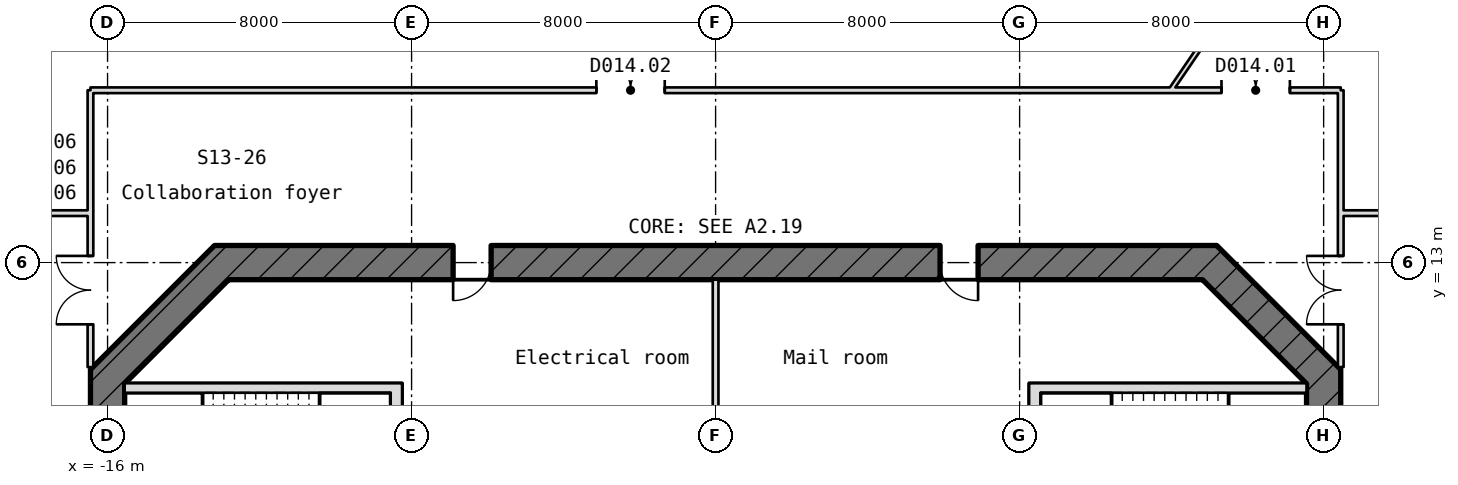
"""IFC4 building model, lengths in metres.
Left out: names, types, materials, properties, quantities, classifications, styles, units other than length and angle.
Written with IfcOpenShell. Run it as: python <this file> out.ifc"""

import sys

from ifc_helpers import new_model, si_unit, direction, frame, frame_2d, origin, place, context, subcontext, project, spatial, rectangle, extrude, element, fill, save


model = new_model("IFC4")
c1 = context("Model", 3, precision=1e-05, world=origin(), true_north=direction((0.0, 1.0)))
c2 = subcontext(c1, "Body", "Model", "MODEL_VIEW")
j1 = project(units=[si_unit("LENGTHUNIT", "METRE"), si_unit("PLANEANGLEUNIT", "RADIAN")], contexts=[c1])
p1 = place(None, origin())
s1 = spatial("IfcSite", under=j1, at=p1, CompositionType="ELEMENT")
p2 = place(p1, origin())
s2 = spatial("IfcBuilding", under=s1, at=p2, CompositionType="ELEMENT")
p3 = place(p2, frame((0.0, 0.0, 198.4)))
s3 = spatial("IfcBuildingStorey", under=s2, at=p3, CompositionType="ELEMENT", Elevation=198.4)
p4 = place(p3, frame((-15.74, 21.43, 0.0), z_axis=(0.0, 0.0, 1.0), x_axis=(-0.766015219317, -0.64282243565, 0.0)))
e1 = element("IfcWall", 1, at=p4, inside=s3, PredefinedType="SOLIDWALL", context=c2, shape_type="SweptSolid", body=[
    extrude(rectangle(XDim=11.371, YDim=0.3, at=frame_2d((5.686, 0.0))), origin(), (0.0, 0.0, 1.0), 3.97),
])
p5 = place(p4, frame((7.672, 0.0, 0.0)))
e2 = element("IfcOpeningElement", 2, at=p5, cuts=e1, PredefinedType="OPENING", context=c2, shape_type="SweptSolid", body=[
    extrude(rectangle(XDim=1.8, YDim=2.4, at=frame_2d((0.9, 1.2))), frame((0.0, 0.16, 0.0), z_axis=(0.0, -1.0, 0.0), x_axis=(1.0, 0.0, 0.0)), (0.0, 0.0, 1.0), 0.32),
])
p6 = place(p4, frame((5.072, 0.0, 0.9)))
e3 = element("IfcOpeningElement", 3, at=p6, cuts=e1, PredefinedType="OPENING", context=c2, shape_type="SweptSolid", body=[
    extrude(rectangle(XDim=2.0, YDim=1.5, at=frame_2d((1.0, 0.75))), frame((0.0, 0.16, 0.0), z_axis=(0.0, -1.0, 0.0), x_axis=(1.0, 0.0, 0.0)), (0.0, 0.0, 1.0), 0.32),
])
p7 = place(p3, frame((16.0, -10.186, -0.18), z_axis=(0.0, 0.0, 1.0), x_axis=(0.0, 1.0, 0.0)))
e4 = element("IfcWall", 4, at=p7, inside=s3, PredefinedType="SHEAR", context=c2, shape_type="SweptSolid", body=[
    extrude(rectangle(XDim=20.373, YDim=0.9, at=frame_2d((10.186, 0.0))), origin(), (0.0, 0.0, 1.0), 4.15),
])
p8 = place(p7, frame((8.986, 0.0, 0.18)))
e5 = element("IfcOpeningElement", 5, at=p8, cuts=e4, PredefinedType="OPENING", context=c2, shape_type="SweptSolid", body=[
    extrude(rectangle(XDim=2.4, YDim=2.1, at=frame_2d((1.2, 1.05))), frame((0.0, 0.46, 0.0), z_axis=(0.0, -1.0, 0.0), x_axis=(1.0, 0.0, 0.0)), (0.0, 0.0, 1.0), 0.92),
])
p9 = place(p7, frame((13.586, 0.0, 0.18)))
e6 = element("IfcOpeningElement", 6, at=p9, cuts=e4, PredefinedType="OPENING", context=c2, shape_type="SweptSolid", body=[
    extrude(rectangle(XDim=1.2, YDim=2.1, at=frame_2d((0.6, 1.05))), frame((0.0, 0.46, 0.0), z_axis=(0.0, -1.0, 0.0), x_axis=(1.0, 0.0, 0.0)), (0.0, 0.0, 1.0), 0.92),
])
p10 = place(p7, frame((3.586, 0.0, 0.18)))
e7 = element("IfcOpeningElement", 7, at=p10, cuts=e4, PredefinedType="OPENING", context=c2, shape_type="SweptSolid", body=[
    extrude(rectangle(XDim=1.2, YDim=2.1, at=frame_2d((0.6, 1.05))), frame((0.0, 0.46, 0.0), z_axis=(0.0, -1.0, 0.0), x_axis=(1.0, 0.0, 0.0)), (0.0, 0.0, 1.0), 0.92),
])
p11 = place(p3, frame((16.132, 9.868, -0.18), z_axis=(0.0, 0.0, 1.0), x_axis=(-0.707106781187, 0.707106781187, 0.0)))
e8 = element("IfcWall", 8, at=p11, inside=s3, PredefinedType="SHEAR", context=c2, shape_type="SweptSolid", body=[
    extrude(rectangle(XDim=4.615, YDim=0.9, at=frame_2d((2.308, 0.0))), origin(), (0.0, 0.0, 1.0), 4.15),
])
p12 = place(p3, frame((13.186, 13.0, -0.18), z_axis=(0.0, 0.0, 1.0), x_axis=(-1.0, 0.0, 0.0)))
e9 = element("IfcWall", 9, at=p12, inside=s3, PredefinedType="SHEAR", context=c2, shape_type="SweptSolid", body=[
    extrude(rectangle(XDim=26.373, YDim=0.9, at=frame_2d((13.186, 0.0))), origin(), (0.0, 0.0, 1.0), 4.15),
])
p13 = place(p12, frame((19.094, 0.0, 0.18)))
e10 = element("IfcOpeningElement", 10, at=p13, cuts=e9, PredefinedType="OPENING", context=c2, shape_type="SweptSolid", body=[
    extrude(rectangle(XDim=1.0, YDim=2.1, at=frame_2d((0.5, 1.05))), frame((0.0, 0.46, 0.0), z_axis=(0.0, -1.0, 0.0), x_axis=(1.0, 0.0, 0.0)), (0.0, 0.0, 1.0), 0.92),
])
p14 = place(p12, frame((6.279, 0.0, 0.18)))
e11 = element("IfcOpeningElement", 11, at=p14, cuts=e9, PredefinedType="OPENING", context=c2, shape_type="SweptSolid", body=[
    extrude(rectangle(XDim=1.0, YDim=2.1, at=frame_2d((0.5, 1.05))), frame((0.0, 0.46, 0.0), z_axis=(0.0, -1.0, 0.0), x_axis=(1.0, 0.0, 0.0)), (0.0, 0.0, 1.0), 0.92),
])
p15 = place(p3, frame((-12.868, 13.132, -0.18), z_axis=(0.0, 0.0, 1.0), x_axis=(-0.707106781187, -0.707106781187, 0.0)))
e12 = element("IfcWall", 12, at=p15, inside=s3, PredefinedType="SHEAR", context=c2, shape_type="SweptSolid", body=[
    extrude(rectangle(XDim=4.615, YDim=0.9, at=frame_2d((2.308, 0.0))), origin(), (0.0, 0.0, 1.0), 4.15),
])
p16 = place(p3, frame((-16.0, 10.186, -0.18), z_axis=(0.0, 0.0, 1.0), x_axis=(0.0, -1.0, 0.0)))
e13 = element("IfcWall", 13, at=p16, inside=s3, PredefinedType="SHEAR", context=c2, shape_type="SweptSolid", body=[
    extrude(rectangle(XDim=20.373, YDim=0.9, at=frame_2d((10.186, 0.0))), origin(), (0.0, 0.0, 1.0), 4.15),
])
p17 = place(p16, frame((8.986, 0.0, 0.18)))
e14 = element("IfcOpeningElement", 14, at=p17, cuts=e13, PredefinedType="OPENING", context=c2, shape_type="SweptSolid", body=[
    extrude(rectangle(XDim=2.4, YDim=2.1, at=frame_2d((1.2, 1.05))), frame((0.0, 0.46, 0.0), z_axis=(0.0, -1.0, 0.0), x_axis=(1.0, 0.0, 0.0)), (0.0, 0.0, 1.0), 0.92),
])
p18 = place(p16, frame((5.586, 0.0, 0.18)))
e15 = element("IfcOpeningElement", 15, at=p18, cuts=e13, PredefinedType="OPENING", context=c2, shape_type="SweptSolid", body=[
    extrude(rectangle(XDim=1.2, YDim=2.1, at=frame_2d((0.6, 1.05))), frame((0.0, 0.46, 0.0), z_axis=(0.0, -1.0, 0.0), x_axis=(1.0, 0.0, 0.0)), (0.0, 0.0, 1.0), 0.92),
])
for number, where, z_axis, x_axis in (
    (16, (-15.55, 9.7, -0.18), (0.0, 0.0, 1.0), (1.0, 0.0, 0.0)),
    (17, (8.55, 9.7, -0.18), (0.0, 0.0, 1.0), (1.0, 0.0, 0.0)),
):
    element("IfcWall", number, at=place(p3, frame(where, z_axis=z_axis, x_axis=x_axis)), inside=s3, PredefinedType="SHEAR", context=c2, shape_type="SweptSolid", body=[
        extrude(rectangle(XDim=7.0, YDim=0.25, at=frame_2d((3.5, 0.0))), origin(), (0.0, 0.0, 1.0), 4.15),
    ])
p19 = place(p3, frame((-8.4, 8.35, -0.18), z_axis=(0.0, 0.0, 1.0), x_axis=(0.0, 1.0, 0.0)))
e18 = element("IfcWall", 18, at=p19, inside=s3, PredefinedType="SHEAR", context=c2, shape_type="SweptSolid", body=[
    extrude(rectangle(XDim=1.475, YDim=0.3, at=frame_2d((0.737, 0.0))), origin(), (0.0, 0.0, 1.0), 4.15),
])
p20 = place(p3, frame((0.0, 8.46, 0.0), z_axis=(0.0, 0.0, 1.0), x_axis=(0.0, 1.0, 0.0)))
e19 = element("IfcWall", 19, at=p20, inside=s3, PredefinedType="PARTITIONING", context=c2, shape_type="SweptSolid", body=[
    extrude(rectangle(XDim=4.09, YDim=0.15, at=frame_2d((2.045, 0.0))), origin(), (0.0, 0.0, 1.0), 3.97),
])
p21 = place(p3, frame((8.4, 8.35, -0.18), z_axis=(0.0, 0.0, 1.0), x_axis=(0.0, 1.0, 0.0)))
e20 = element("IfcWall", 20, at=p21, inside=s3, PredefinedType="SHEAR", context=c2, shape_type="SweptSolid", body=[
    extrude(rectangle(XDim=1.475, YDim=0.3, at=frame_2d((0.737, 0.0))), origin(), (0.0, 0.0, 1.0), 4.15),
])
p22 = place(p3, frame((-19.15, 14.301, 0.0), z_axis=(0.0, 0.0, 1.0), x_axis=(1.0, 0.0, 0.0)))
e21 = element("IfcWall", 21, at=p22, inside=s3, PredefinedType="PARTITIONING", context=c2, shape_type="SweptSolid", body=[
    extrude(rectangle(XDim=2.7, YDim=0.15, at=frame_2d((1.35, 0.0))), origin(), (0.0, 0.0, 1.0), 3.97),
])
p23 = place(p3, frame((-16.45, 10.25, 0.0), z_axis=(0.0, 0.0, 1.0), x_axis=(0.0, 1.0, 0.0)))
e22 = element("IfcWall", 22, at=p23, inside=s3, PredefinedType="PARTITIONING", context=c2, shape_type="SweptSolid", body=[
    extrude(rectangle(XDim=7.284, YDim=0.15, at=frame_2d((3.642, 0.0))), origin(), (0.0, 0.0, 1.0), 3.97),
])
p24 = place(p23, frame((1.126, 0.0, 0.0)))
e23 = element("IfcOpeningElement", 23, at=p24, cuts=e22, PredefinedType="OPENING", context=c2, shape_type="SweptSolid", body=[
    extrude(rectangle(XDim=1.8, YDim=2.1, at=frame_2d((0.9, 1.05))), frame((0.0, 0.085, 0.0), z_axis=(0.0, -1.0, 0.0), x_axis=(1.0, 0.0, 0.0)), (0.0, 0.0, 1.0), 0.17),
])
p25 = place(p3, frame((-16.45, 17.534, 0.0), z_axis=(0.0, 0.0, 1.0), x_axis=(1.0, 0.0, 0.0)))
e24 = element("IfcWall", 24, at=p25, inside=s3, PredefinedType="PARTITIONING", context=c2, shape_type="SweptSolid", body=[
    extrude(rectangle(XDim=32.9, YDim=0.15, at=frame_2d((16.45, 0.0))), origin(), (0.0, 0.0, 1.0), 3.97),
])
p26 = place(p25, frame((29.762, 0.0, 0.0)))
e25 = element("IfcOpeningElement", 25, at=p26, cuts=e24, PredefinedType="OPENING", context=c2, shape_type="SweptSolid", body=[
    extrude(rectangle(XDim=1.8, YDim=2.1, at=frame_2d((0.9, 1.05))), frame((0.0, 0.085, 0.0), z_axis=(0.0, -1.0, 0.0), x_axis=(1.0, 0.0, 0.0)), (0.0, 0.0, 1.0), 0.17),
])
p27 = place(p25, frame((13.312, 0.0, 0.0)))
e26 = element("IfcOpeningElement", 26, at=p27, cuts=e24, PredefinedType="OPENING", context=c2, shape_type="SweptSolid", body=[
    extrude(rectangle(XDim=1.8, YDim=2.1, at=frame_2d((0.9, 1.05))), frame((0.0, 0.085, 0.0), z_axis=(0.0, -1.0, 0.0), x_axis=(1.0, 0.0, 0.0)), (0.0, 0.0, 1.0), 0.17),
])
p28 = place(p3, frame((11.974, 17.534, 0.0), z_axis=(0.0, 0.0, 1.0), x_axis=(0.563957789677, 0.825803615554, 0.0)))
e27 = element("IfcWall", 27, at=p28, inside=s3, PredefinedType="PARTITIONING", context=c2, shape_type="SweptSolid", body=[
    extrude(rectangle(XDim=6.318, YDim=0.12, at=frame_2d((3.159, 0.0))), origin(), (0.0, 0.0, 1.0), 3.97),
])
p29 = place(p3, frame((16.45, 10.25, 0.0), z_axis=(0.0, 0.0, 1.0), x_axis=(0.0, 1.0, 0.0)))
e28 = element("IfcWall", 28, at=p29, inside=s3, PredefinedType="PARTITIONING", context=c2, shape_type="SweptSolid", body=[
    extrude(rectangle(XDim=7.284, YDim=0.15, at=frame_2d((3.642, 0.0))), origin(), (0.0, 0.0, 1.0), 3.97),
])
p30 = place(p29, frame((1.126, 0.0, 0.0)))
e29 = element("IfcOpeningElement", 29, at=p30, cuts=e28, PredefinedType="OPENING", context=c2, shape_type="SweptSolid", body=[
    extrude(rectangle(XDim=1.8, YDim=2.1, at=frame_2d((0.9, 1.05))), frame((0.0, 0.085, 0.0), z_axis=(0.0, -1.0, 0.0), x_axis=(1.0, 0.0, 0.0)), (0.0, 0.0, 1.0), 0.17),
])
p31 = place(p3, frame((16.45, 14.301, 0.0), z_axis=(0.0, 0.0, 1.0), x_axis=(1.0, 0.0, 0.0)))
e30 = element("IfcWall", 30, at=p31, inside=s3, PredefinedType="PARTITIONING", context=c2, shape_type="SweptSolid", body=[
    extrude(rectangle(XDim=2.7, YDim=0.15, at=frame_2d((1.35, 0.0))), origin(), (0.0, 0.0, 1.0), 3.97),
])
p32 = place(p13, origin())
e31 = element("IfcDoor", 31, at=p32, inside=s3, OperationType="SINGLE_SWING_RIGHT", PredefinedType="DOOR", context=c2, shape_type="SweptSolid", body=[
    extrude(rectangle(XDim=1.0, YDim=2.1, at=frame_2d((0.5, 1.05))), frame((0.0, 0.025, 0.0), z_axis=(0.0, -1.0, 0.0), x_axis=(1.0, 0.0, 0.0)), (0.0, 0.0, 1.0), 0.05),
])
fill(e10, e31)
p33 = place(p14, origin())
e32 = element("IfcDoor", 32, at=p33, inside=s3, OperationType="SINGLE_SWING_RIGHT", PredefinedType="DOOR", context=c2, shape_type="SweptSolid", body=[
    extrude(rectangle(XDim=1.0, YDim=2.1, at=frame_2d((0.5, 1.05))), frame((0.0, 0.025, 0.0), z_axis=(0.0, -1.0, 0.0), x_axis=(1.0, 0.0, 0.0)), (0.0, 0.0, 1.0), 0.05),
])
fill(e11, e32)
p34 = place(p26, origin())
e33 = element("IfcDoor", 33, at=p34, inside=s3, OperationType="DOUBLE_DOOR_SINGLE_SWING", PredefinedType="DOOR", context=c2, shape_type="SweptSolid", body=[
    extrude(rectangle(XDim=1.8, YDim=2.1, at=frame_2d((0.9, 1.05))), frame((0.0, 0.025, 0.0), z_axis=(0.0, -1.0, 0.0), x_axis=(1.0, 0.0, 0.0)), (0.0, 0.0, 1.0), 0.05),
])
fill(e25, e33)
p35 = place(p27, origin())
e34 = element("IfcDoor", 34, at=p35, inside=s3, OperationType="DOUBLE_DOOR_SINGLE_SWING", PredefinedType="DOOR", context=c2, shape_type="SweptSolid", body=[
    extrude(rectangle(XDim=1.8, YDim=2.1, at=frame_2d((0.9, 1.05))), frame((0.0, 0.025, 0.0), z_axis=(0.0, -1.0, 0.0), x_axis=(1.0, 0.0, 0.0)), (0.0, 0.0, 1.0), 0.05),
])
fill(e26, e34)
p36 = place(p24, origin())
e35 = element("IfcDoor", 35, at=p36, inside=s3, OperationType="DOUBLE_DOOR_SINGLE_SWING", PredefinedType="DOOR", context=c2, shape_type="SweptSolid", body=[
    extrude(rectangle(XDim=1.8, YDim=2.1, at=frame_2d((0.9, 1.05))), frame((0.0, 0.025, 0.0), z_axis=(0.0, -1.0, 0.0), x_axis=(1.0, 0.0, 0.0)), (0.0, 0.0, 1.0), 0.05),
])
fill(e23, e35)
p37 = place(p30, origin())
e36 = element("IfcDoor", 36, at=p37, inside=s3, OperationType="DOUBLE_DOOR_SINGLE_SWING", PredefinedType="DOOR", context=c2, shape_type="SweptSolid", body=[
    extrude(rectangle(XDim=1.8, YDim=2.1, at=frame_2d((0.9, 1.05))), frame((0.0, 0.025, 0.0), z_axis=(0.0, -1.0, 0.0), x_axis=(1.0, 0.0, 0.0)), (0.0, 0.0, 1.0), 0.05),
])
fill(e29, e36)
save(model, sys.argv[1])
